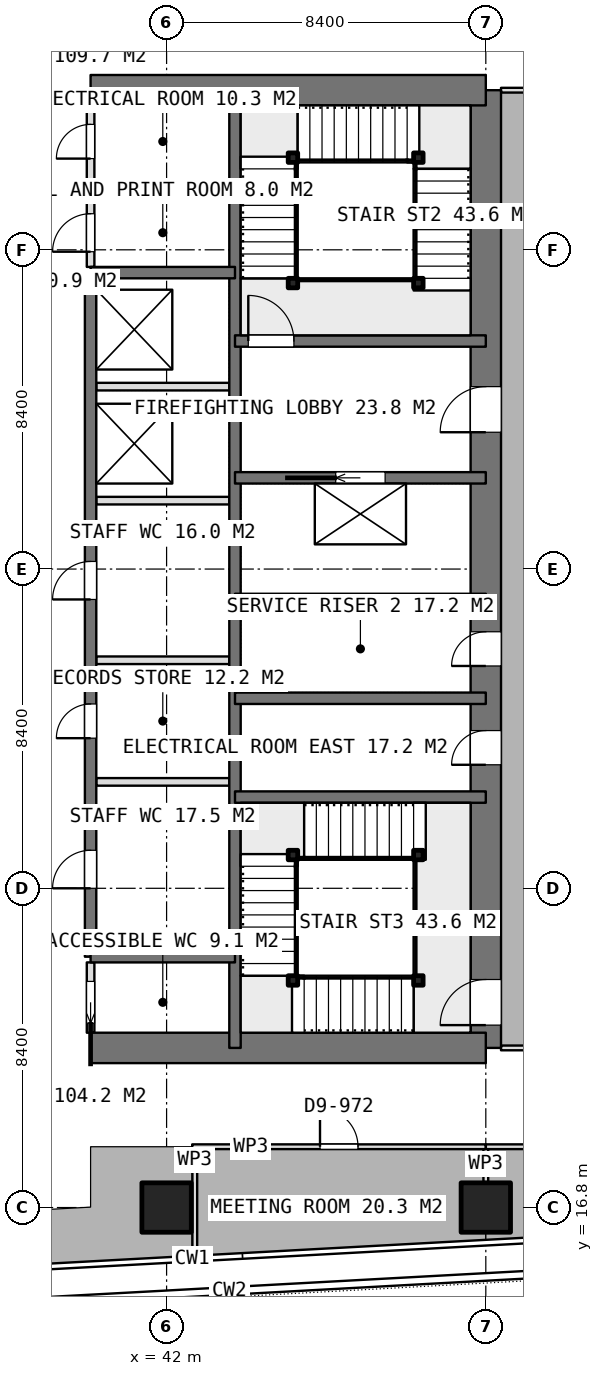
"""IFC4 building model, lengths in metres.
Left out: names, types, materials, properties, quantities, classifications, styles, units other than length and angle.
Written with IfcOpenShell. Run it as: python <this file> out.ifc"""

import sys

from ifc_helpers import new_model, si_unit, direction, frame, frame_2d, origin, origin_2d, place, context, subcontext, project, spatial, rectangle, extrude, element, fill, save


model = new_model("IFC4")
c1 = context("Model", 3, precision=1e-05, world=origin(), true_north=direction((0.0, 1.0)))
c2 = subcontext(c1, "Body", "Model", "MODEL_VIEW")
j1 = project(units=[si_unit("LENGTHUNIT", "METRE"), si_unit("PLANEANGLEUNIT", "RADIAN")], contexts=[c1])
p1 = place(None, origin())
s1 = spatial("IfcSite", under=j1, at=p1, CompositionType="ELEMENT")
p2 = place(p1, origin())
s2 = spatial("IfcBuilding", under=s1, at=p2, CompositionType="ELEMENT")
p3 = place(p2, frame((0.0, 0.0, 261.35)))
s3 = spatial("IfcBuildingStorey", under=s2, at=p3, CompositionType="ELEMENT", Elevation=261.35)
for number, where, z_axis, x_axis in (
    (1, (40.0, 21.0, 0.0), (0.0, 0.0, 1.0), (1.0, 0.0, 0.0)),
    (2, (40.0, 46.2, 0.0), (0.0, 0.0, 1.0), (1.0, 0.0, 0.0)),
):
    element("IfcWall", number, at=place(p3, frame(where, z_axis=z_axis, x_axis=x_axis)), inside=s3, PredefinedType="SHEAR", context=c2, shape_type="SweptSolid", body=[
        extrude(rectangle(XDim=10.4, YDim=0.8, at=frame_2d((5.2, 0.0))), origin(), (0.0, 0.0, 1.0), 3.75),
    ])
p4 = place(p3, frame((50.4, 21.0, 0.0), z_axis=(0.0, 0.0, 1.0), x_axis=(0.0, 1.0, 0.0)))
e3 = element("IfcWall", 3, at=p4, inside=s3, PredefinedType="SHEAR", context=c2, shape_type="SweptSolid", body=[
    extrude(rectangle(XDim=25.2, YDim=0.8, at=frame_2d((12.6, 0.0))), origin(), (0.0, 0.0, 1.0), 3.75),
])
p5 = place(p4, frame((16.2, 0.0, 0.0)))
e4 = element("IfcOpeningElement", 4, at=p5, cuts=e3, PredefinedType="OPENING", context=c2, shape_type="SweptSolid", body=[
    extrude(rectangle(XDim=1.2, YDim=2.1, at=frame_2d((0.6, 1.05))), frame((0.0, 0.41, 0.0), z_axis=(0.0, -1.0, 0.0), x_axis=(1.0, 0.0, 0.0)), (0.0, 0.0, 1.0), 0.82),
])
p6 = place(p4, frame((10.05, 0.0, 0.0)))
e5 = element("IfcOpeningElement", 5, at=p6, cuts=e3, PredefinedType="OPENING", context=c2, shape_type="SweptSolid", body=[
    extrude(rectangle(XDim=0.9, YDim=2.1, at=frame_2d((0.45, 1.05))), frame((0.0, 0.41, 0.0), z_axis=(0.0, -1.0, 0.0), x_axis=(1.0, 0.0, 0.0)), (0.0, 0.0, 1.0), 0.82),
])
p7 = place(p4, frame((7.45, 0.0, 0.0)))
e6 = element("IfcOpeningElement", 6, at=p7, cuts=e3, PredefinedType="OPENING", context=c2, shape_type="SweptSolid", body=[
    extrude(rectangle(XDim=0.9, YDim=2.1, at=frame_2d((0.45, 1.05))), frame((0.0, 0.41, 0.0), z_axis=(0.0, -1.0, 0.0), x_axis=(1.0, 0.0, 0.0)), (0.0, 0.0, 1.0), 0.82),
])
p8 = place(p4, frame((0.6, 0.0, 0.0)))
e7 = element("IfcOpeningElement", 7, at=p8, cuts=e3, PredefinedType="OPENING", context=c2, shape_type="SweptSolid", body=[
    extrude(rectangle(XDim=1.2, YDim=2.1, at=frame_2d((0.6, 1.05))), frame((0.0, 0.41, 0.0), z_axis=(0.0, -1.0, 0.0), x_axis=(1.0, 0.0, 0.0)), (0.0, 0.0, 1.0), 0.82),
])
p9 = place(p3, frame((43.8, 21.0, 0.0), z_axis=(0.0, 0.0, 1.0), x_axis=(0.0, 1.0, 0.0)))
e8 = element("IfcWall", 8, at=p9, inside=s3, PredefinedType="SHEAR", context=c2, shape_type="SweptSolid", body=[
    extrude(rectangle(XDim=25.2, YDim=0.3, at=frame_2d((12.6, 0.0))), origin(), (0.0, 0.0, 1.0), 3.75),
])
p10 = place(p3, frame((40.0, 23.4, 0.0), z_axis=(0.0, 0.0, 1.0), x_axis=(0.0, 1.0, 0.0)))
e9 = element("IfcWall", 9, at=p10, inside=s3, PredefinedType="SHEAR", context=c2, shape_type="SweptSolid", body=[
    extrude(rectangle(XDim=18.0, YDim=0.3, at=frame_2d((9.0, 0.0))), origin(), (0.0, 0.0, 1.0), 3.75),
])
p11 = place(p10, frame((1.8, 0.0, 0.0)))
e10 = element("IfcOpeningElement", 10, at=p11, cuts=e9, PredefinedType="OPENING", context=c2, shape_type="SweptSolid", body=[
    extrude(rectangle(XDim=1.0, YDim=2.1, at=frame_2d((0.5, 1.05))), frame((0.0, 0.16, 0.0), z_axis=(0.0, -1.0, 0.0), x_axis=(1.0, 0.0, 0.0)), (0.0, 0.0, 1.0), 0.32),
])
p12 = place(p10, frame((5.75, 0.0, 0.0)))
e11 = element("IfcOpeningElement", 11, at=p12, cuts=e9, PredefinedType="OPENING", context=c2, shape_type="SweptSolid", body=[
    extrude(rectangle(XDim=0.9, YDim=2.1, at=frame_2d((0.45, 1.05))), frame((0.0, 0.16, 0.0), z_axis=(0.0, -1.0, 0.0), x_axis=(1.0, 0.0, 0.0)), (0.0, 0.0, 1.0), 0.32),
])
p13 = place(p10, frame((9.4, 0.0, 0.0)))
e12 = element("IfcOpeningElement", 12, at=p13, cuts=e9, PredefinedType="OPENING", context=c2, shape_type="SweptSolid", body=[
    extrude(rectangle(XDim=1.0, YDim=2.1, at=frame_2d((0.5, 1.05))), frame((0.0, 0.16, 0.0), z_axis=(0.0, -1.0, 0.0), x_axis=(1.0, 0.0, 0.0)), (0.0, 0.0, 1.0), 0.32),
])
for number, where, z_axis, x_axis in (
    (13, (40.0, 23.4, 0.0), (0.0, 0.0, 1.0), (1.0, 0.0, 0.0)),
    (14, (40.0, 41.4, 0.0), (0.0, 0.0, 1.0), (1.0, 0.0, 0.0)),
):
    element("IfcWall", number, at=place(p3, frame(where, z_axis=z_axis, x_axis=x_axis)), inside=s3, PredefinedType="SHEAR", context=c2, shape_type="SweptSolid", body=[
        extrude(rectangle(XDim=3.8, YDim=0.3, at=frame_2d((1.9, 0.0))), origin(), (0.0, 0.0, 1.0), 3.75),
    ])
for number, where, z_axis, x_axis in (
    (15, (43.8, 27.6, 0.0), (0.0, 0.0, 1.0), (1.0, 0.0, 0.0)),
    (16, (43.8, 30.2, 0.0), (0.0, 0.0, 1.0), (1.0, 0.0, 0.0)),
    (17, (43.8, 32.8, 0.0), (0.0, 0.0, 1.0), (1.0, 0.0, 0.0)),
):
    element("IfcWall", number, at=place(p3, frame(where, z_axis=z_axis, x_axis=x_axis)), inside=s3, PredefinedType="SHEAR", context=c2, shape_type="SweptSolid", body=[
        extrude(rectangle(XDim=6.6, YDim=0.3, at=frame_2d((3.3, 0.0))), origin(), (0.0, 0.0, 1.0), 3.75),
    ])
p14 = place(p3, frame((43.8, 36.0, 0.0), z_axis=(0.0, 0.0, 1.0), x_axis=(1.0, 0.0, 0.0)))
e18 = element("IfcWall", 18, at=p14, inside=s3, PredefinedType="SHEAR", context=c2, shape_type="SweptSolid", body=[
    extrude(rectangle(XDim=6.6, YDim=0.3, at=frame_2d((3.3, 0.0))), origin(), (0.0, 0.0, 1.0), 3.75),
])
p15 = place(p14, frame((2.65, 0.0, 0.0)))
e19 = element("IfcOpeningElement", 19, at=p15, cuts=e18, PredefinedType="OPENING", context=c2, shape_type="SweptSolid", body=[
    extrude(rectangle(XDim=1.3, YDim=2.1, at=frame_2d((0.65, 1.05))), frame((0.0, 0.16, 0.0), z_axis=(0.0, -1.0, 0.0), x_axis=(1.0, 0.0, 0.0)), (0.0, 0.0, 1.0), 0.32),
])
p16 = place(p3, frame((43.8, 39.6, 0.0), z_axis=(0.0, 0.0, 1.0), x_axis=(1.0, 0.0, 0.0)))
e20 = element("IfcWall", 20, at=p16, inside=s3, PredefinedType="SHEAR", context=c2, shape_type="SweptSolid", body=[
    extrude(rectangle(XDim=6.6, YDim=0.3, at=frame_2d((3.3, 0.0))), origin(), (0.0, 0.0, 1.0), 3.75),
])
p17 = place(p16, frame((0.35, 0.0, 0.0)))
e21 = element("IfcOpeningElement", 21, at=p17, cuts=e20, PredefinedType="OPENING", context=c2, shape_type="SweptSolid", body=[
    extrude(rectangle(XDim=1.2, YDim=2.1, at=frame_2d((0.6, 1.05))), frame((0.0, 0.16, 0.0), z_axis=(0.0, -1.0, 0.0), x_axis=(1.0, 0.0, 0.0)), (0.0, 0.0, 1.0), 0.32),
])
for number, where, z_axis, x_axis in (
    (22, (42.0, 16.8, 0.0), (0.0, 0.0, 1.0), (1.0, 0.0, 0.0)),
    (23, (50.4, 16.8, 0.0), (0.0, 0.0, 1.0), (1.0, 0.0, 0.0)),
):
    element("IfcColumn", number, at=place(p3, frame(where, z_axis=z_axis, x_axis=x_axis)), inside=s3, PredefinedType="COLUMN", context=c2, shape_type="SweptSolid", body=[
        extrude(rectangle(XDim=1.3, YDim=1.3, at=origin_2d()), origin(), (0.0, 0.0, 1.0), 3.75),
    ])
for number, where, z_axis, x_axis in (
    (24, (40.15, 35.4, 0.0), (0.0, 0.0, 1.0), (1.0, 0.0, 0.0)),
    (25, (40.15, 38.4, 0.0), (0.0, 0.0, 1.0), (1.0, 0.0, 0.0)),
):
    element("IfcWall", number, at=place(p3, frame(where, z_axis=z_axis, x_axis=x_axis)), inside=s3, PredefinedType="PARTITIONING", context=c2, shape_type="SweptSolid", body=[
        extrude(rectangle(XDim=3.5, YDim=0.2, at=frame_2d((1.75, 0.0))), origin(), (0.0, 0.0, 1.0), 3.5),
    ])
p18 = place(p3, frame((40.0, 21.4, 0.0), z_axis=(0.0, 0.0, 1.0), x_axis=(0.0, 1.0, 0.0)))
e26 = element("IfcWall", 26, at=p18, inside=s3, PredefinedType="PARTITIONING", context=c2, shape_type="SweptSolid", body=[
    extrude(rectangle(XDim=1.85, YDim=0.2, at=frame_2d((0.925, 0.0))), origin(), (0.0, 0.0, 1.0), 3.5),
])
p19 = place(p18, frame((0.25, 0.0, 0.0)))
e27 = element("IfcOpeningElement", 27, at=p19, cuts=e26, PredefinedType="OPENING", context=c2, shape_type="SweptSolid", body=[
    extrude(rectangle(XDim=1.1, YDim=2.1, at=frame_2d((0.55, 1.05))), frame((0.0, 0.11, 0.0), z_axis=(0.0, -1.0, 0.0), x_axis=(1.0, 0.0, 0.0)), (0.0, 0.0, 1.0), 0.22),
])
p20 = place(p3, frame((40.0, 41.55, 0.0), z_axis=(0.0, 0.0, 1.0), x_axis=(0.0, 1.0, 0.0)))
e28 = element("IfcWall", 28, at=p20, inside=s3, PredefinedType="PARTITIONING", context=c2, shape_type="SweptSolid", body=[
    extrude(rectangle(XDim=4.25, YDim=0.2, at=frame_2d((2.125, 0.0))), origin(), (0.0, 0.0, 1.0), 3.5),
])
p21 = place(p20, frame((2.85, 0.0, 0.0)))
e29 = element("IfcOpeningElement", 29, at=p21, cuts=e28, PredefinedType="OPENING", context=c2, shape_type="SweptSolid", body=[
    extrude(rectangle(XDim=0.9, YDim=2.1, at=frame_2d((0.45, 1.05))), frame((0.0, 0.11, 0.0), z_axis=(0.0, -1.0, 0.0), x_axis=(1.0, 0.0, 0.0)), (0.0, 0.0, 1.0), 0.22),
])
p22 = place(p20, frame((0.4, 0.0, 0.0)))
e30 = element("IfcOpeningElement", 30, at=p22, cuts=e28, PredefinedType="OPENING", context=c2, shape_type="SweptSolid", body=[
    extrude(rectangle(XDim=1.0, YDim=2.1, at=frame_2d((0.5, 1.05))), frame((0.0, 0.11, 0.0), z_axis=(0.0, -1.0, 0.0), x_axis=(1.0, 0.0, 0.0)), (0.0, 0.0, 1.0), 0.22),
])
for number, where, z_axis, x_axis in (
    (31, (40.15, 28.0, 0.0), (0.0, 0.0, 1.0), (1.0, 0.0, 0.0)),
    (32, (40.15, 31.2, 0.0), (0.0, 0.0, 1.0), (1.0, 0.0, 0.0)),
):
    element("IfcWall", number, at=place(p3, frame(where, z_axis=z_axis, x_axis=x_axis)), inside=s3, PredefinedType="PARTITIONING", context=c2, shape_type="SweptSolid", body=[
        extrude(rectangle(XDim=3.5, YDim=0.2, at=frame_2d((1.75, 0.0))), origin(), (0.0, 0.0, 1.0), 3.5),
    ])
p23 = place(p3, frame((40.0, 43.5, 0.0), z_axis=(0.0, 0.0, 1.0), x_axis=(1.0, 0.0, 0.0)))
e33 = element("IfcWall", 33, at=p23, inside=s3, PredefinedType="PARTITIONING", context=c2, shape_type="SweptSolid", body=[
    extrude(rectangle(XDim=3.65, YDim=0.2, at=frame_2d((1.825, 0.0))), origin(), (0.0, 0.0, 1.0), 3.5),
])
p24 = place(p3, frame((50.4, 18.4, 0.0), z_axis=(0.0, 0.0, 1.0), x_axis=(0.0, -1.0, 0.0)))
e34 = element("IfcWall", 34, at=p24, inside=s3, PredefinedType="PARTITIONING", context=c2, shape_type="SweptSolid", body=[
    extrude(rectangle(XDim=0.93, YDim=0.125, at=frame_2d((0.465, 0.0))), origin(), (0.0, 0.0, 1.0), 3.5),
])
p25 = place(p3, frame((42.742, 15.538, 0.0), z_axis=(0.0, 0.0, 1.0), x_axis=(0.0, 1.0, 0.0)))
e35 = element("IfcWall", 35, at=p25, inside=s3, PredefinedType="PARTITIONING", context=c2, shape_type="SweptSolid", body=[
    extrude(rectangle(XDim=2.799, YDim=0.125, at=frame_2d((1.399, 0.0))), origin(), (0.0, 0.0, 1.0), 3.5),
])
p26 = place(p3, frame((42.674, 18.4, 0.0), z_axis=(0.0, 0.0, 1.0), x_axis=(1.0, 0.0, 0.0)))
e36 = element("IfcWall", 36, at=p26, inside=s3, PredefinedType="PARTITIONING", context=c2, shape_type="SweptSolid", body=[
    extrude(rectangle(XDim=7.726, YDim=0.125, at=frame_2d((3.863, 0.0))), origin(), (0.0, 0.0, 1.0), 3.5),
])
p27 = place(p26, frame((3.363, 0.0, 0.0)))
e37 = element("IfcOpeningElement", 37, at=p27, cuts=e36, PredefinedType="OPENING", context=c2, shape_type="SweptSolid", body=[
    extrude(rectangle(XDim=1.0, YDim=2.1, at=frame_2d((0.5, 1.05))), frame((0.0, 0.073, 0.0), z_axis=(0.0, -1.0, 0.0), x_axis=(1.0, 0.0, 0.0)), (0.0, 0.0, 1.0), 0.145),
])
p28 = place(p3, frame((50.401, 18.4, 0.0), z_axis=(0.0, 0.0, 1.0), x_axis=(1.0, 0.0, 0.0)))
e38 = element("IfcWall", 38, at=p28, inside=s3, PredefinedType="PARTITIONING", context=c2, shape_type="SweptSolid", body=[
    extrude(rectangle(XDim=5.999, YDim=0.125, at=frame_2d((3.0, 0.0))), origin(), (0.0, 0.0, 1.0), 3.5),
])
p29 = place(p28, frame((2.499, 0.0, 0.0)))
e39 = element("IfcOpeningElement", 39, at=p29, cuts=e38, PredefinedType="OPENING", context=c2, shape_type="SweptSolid", body=[
    extrude(rectangle(XDim=1.0, YDim=2.1, at=frame_2d((0.5, 1.05))), frame((0.0, 0.073, 0.0), z_axis=(0.0, -1.0, 0.0), x_axis=(1.0, 0.0, 0.0)), (0.0, 0.0, 1.0), 0.145),
])
for number, where, z_axis, x_axis in (
    (40, (53.124, 21.0, 0.0), (0.0, 0.0, 1.0), (-1.0, 0.0, 0.0)),
    (41, (50.8, 46.2, 0.0), (0.0, 0.0, 1.0), (1.0, 0.0, 0.0)),
):
    element("IfcWall", number, at=place(p3, frame(where, z_axis=z_axis, x_axis=x_axis)), inside=s3, PredefinedType="PARTITIONING", context=c2, shape_type="SweptSolid", body=[
        extrude(rectangle(XDim=2.324, YDim=0.125, at=frame_2d((1.162, 0.0))), origin(), (0.0, 0.0, 1.0), 3.5),
    ])
for number, where, z_axis, x_axis in (
    (42, (45.325, 41.125, 0.0), (0.0, 0.0, 1.0), (1.0, 0.0, 0.0)),
    (43, (45.325, 44.425, 0.0), (0.0, 0.0, 1.0), (1.0, 0.0, 0.0)),
    (44, (48.625, 44.425, 0.0), (0.0, 0.0, 1.0), (1.0, 0.0, 0.0)),
    (45, (48.625, 41.125, 0.0), (0.0, 0.0, 1.0), (1.0, 0.0, 0.0)),
    (46, (48.625, 22.775, 0.0), (0.0, 0.0, 1.0), (1.0, 0.0, 0.0)),
    (47, (45.325, 22.775, 0.0), (0.0, 0.0, 1.0), (1.0, 0.0, 0.0)),
    (48, (45.325, 26.075, 0.0), (0.0, 0.0, 1.0), (1.0, 0.0, 0.0)),
    (49, (48.625, 26.075, 0.0), (0.0, 0.0, 1.0), (1.0, 0.0, 0.0)),
):
    element("IfcColumn", number, at=place(p3, frame(where, z_axis=z_axis, x_axis=x_axis)), inside=s3, PredefinedType="COLUMN", context=c2, shape_type="SweptSolid", body=[
        extrude(rectangle(XDim=0.25, YDim=0.25, at=origin_2d()), origin(), (0.0, 0.0, 1.0), 3.75),
    ])
p30 = place(p5, origin())
e50 = element("IfcDoor", 50, at=p30, inside=s3, OperationType="SINGLE_SWING_LEFT", PredefinedType="DOOR", context=c2, shape_type="SweptSolid", body=[
    extrude(rectangle(XDim=1.2, YDim=2.1, at=frame_2d((0.6, 1.05))), frame((0.0, 0.025, 0.0), z_axis=(0.0, -1.0, 0.0), x_axis=(1.0, 0.0, 0.0)), (0.0, 0.0, 1.0), 0.05),
])
fill(e4, e50)
p31 = place(p6, origin())
e51 = element("IfcDoor", 51, at=p31, inside=s3, OperationType="SINGLE_SWING_LEFT", PredefinedType="DOOR", context=c2, shape_type="SweptSolid", body=[
    extrude(rectangle(XDim=0.9, YDim=2.1, at=frame_2d((0.45, 1.05))), frame((0.0, 0.025, 0.0), z_axis=(0.0, -1.0, 0.0), x_axis=(1.0, 0.0, 0.0)), (0.0, 0.0, 1.0), 0.05),
])
fill(e5, e51)
p32 = place(p7, origin())
e52 = element("IfcDoor", 52, at=p32, inside=s3, OperationType="SINGLE_SWING_LEFT", PredefinedType="DOOR", context=c2, shape_type="SweptSolid", body=[
    extrude(rectangle(XDim=0.9, YDim=2.1, at=frame_2d((0.45, 1.05))), frame((0.0, 0.025, 0.0), z_axis=(0.0, -1.0, 0.0), x_axis=(1.0, 0.0, 0.0)), (0.0, 0.0, 1.0), 0.05),
])
fill(e6, e52)
p33 = place(p19, origin())
e53 = element("IfcDoor", 53, at=p33, inside=s3, OperationType="SLIDING_TO_LEFT", PredefinedType="DOOR", context=c2, shape_type="SweptSolid", body=[
    extrude(rectangle(XDim=1.1, YDim=2.1, at=frame_2d((0.55, 1.05))), frame((0.0, 0.025, 0.0), z_axis=(0.0, -1.0, 0.0), x_axis=(1.0, 0.0, 0.0)), (0.0, 0.0, 1.0), 0.05),
])
fill(e27, e53)
p34 = place(p21, origin())
e54 = element("IfcDoor", 54, at=p34, inside=s3, OperationType="SINGLE_SWING_LEFT", PredefinedType="DOOR", context=c2, shape_type="SweptSolid", body=[
    extrude(rectangle(XDim=0.9, YDim=2.1, at=frame_2d((0.45, 1.05))), frame((0.0, 0.025, 0.0), z_axis=(0.0, -1.0, 0.0), x_axis=(1.0, 0.0, 0.0)), (0.0, 0.0, 1.0), 0.05),
])
fill(e29, e54)
p35 = place(p22, origin())
e55 = element("IfcDoor", 55, at=p35, inside=s3, OperationType="SINGLE_SWING_LEFT", PredefinedType="DOOR", context=c2, shape_type="SweptSolid", body=[
    extrude(rectangle(XDim=1.0, YDim=2.1, at=frame_2d((0.5, 1.05))), frame((0.0, 0.025, 0.0), z_axis=(0.0, -1.0, 0.0), x_axis=(1.0, 0.0, 0.0)), (0.0, 0.0, 1.0), 0.05),
])
fill(e30, e55)
p36 = place(p11, origin())
e56 = element("IfcDoor", 56, at=p36, inside=s3, OperationType="SINGLE_SWING_LEFT", PredefinedType="DOOR", context=c2, shape_type="SweptSolid", body=[
    extrude(rectangle(XDim=1.0, YDim=2.1, at=frame_2d((0.5, 1.05))), frame((0.0, 0.025, 0.0), z_axis=(0.0, -1.0, 0.0), x_axis=(1.0, 0.0, 0.0)), (0.0, 0.0, 1.0), 0.05),
])
fill(e10, e56)
p37 = place(p12, origin())
e57 = element("IfcDoor", 57, at=p37, inside=s3, OperationType="SINGLE_SWING_LEFT", PredefinedType="DOOR", context=c2, shape_type="SweptSolid", body=[
    extrude(rectangle(XDim=0.9, YDim=2.1, at=frame_2d((0.45, 1.05))), frame((0.0, 0.025, 0.0), z_axis=(0.0, -1.0, 0.0), x_axis=(1.0, 0.0, 0.0)), (0.0, 0.0, 1.0), 0.05),
])
fill(e11, e57)
p38 = place(p13, origin())
e58 = element("IfcDoor", 58, at=p38, inside=s3, OperationType="SINGLE_SWING_LEFT", PredefinedType="DOOR", context=c2, shape_type="SweptSolid", body=[
    extrude(rectangle(XDim=1.0, YDim=2.1, at=frame_2d((0.5, 1.05))), frame((0.0, 0.025, 0.0), z_axis=(0.0, -1.0, 0.0), x_axis=(1.0, 0.0, 0.0)), (0.0, 0.0, 1.0), 0.05),
])
fill(e12, e58)
p39 = place(p15, origin())
e59 = element("IfcDoor", 59, at=p39, inside=s3, OperationType="SLIDING_TO_LEFT", PredefinedType="USERDEFINED", context=c2, shape_type="SweptSolid", body=[
    extrude(rectangle(XDim=1.3, YDim=2.1, at=frame_2d((0.65, 1.05))), frame((0.0, 0.025, 0.0), z_axis=(0.0, -1.0, 0.0), x_axis=(1.0, 0.0, 0.0)), (0.0, 0.0, 1.0), 0.05),
])
fill(e19, e59)
p40 = place(p27, origin())
e60 = element("IfcDoor", 60, at=p40, inside=s3, OperationType="SINGLE_SWING_LEFT", PredefinedType="DOOR", context=c2, shape_type="SweptSolid", body=[
    extrude(rectangle(XDim=1.0, YDim=2.1, at=frame_2d((0.5, 1.05))), frame((0.0, 0.025, 0.0), z_axis=(0.0, -1.0, 0.0), x_axis=(1.0, 0.0, 0.0)), (0.0, 0.0, 1.0), 0.05),
])
fill(e37, e60)
p41 = place(p17, origin())
e61 = element("IfcDoor", 61, at=p41, inside=s3, OperationType="SINGLE_SWING_RIGHT", PredefinedType="DOOR", context=c2, shape_type="SweptSolid", body=[
    extrude(rectangle(XDim=1.2, YDim=2.1, at=frame_2d((0.6, 1.05))), frame((0.0, 0.025, 0.0), z_axis=(0.0, -1.0, 0.0), x_axis=(1.0, 0.0, 0.0)), (0.0, 0.0, 1.0), 0.05),
])
fill(e21, e61)
p42 = place(p8, origin())
e62 = element("IfcDoor", 62, at=p42, inside=s3, OperationType="SINGLE_SWING_RIGHT", PredefinedType="DOOR", context=c2, shape_type="SweptSolid", body=[
    extrude(rectangle(XDim=1.2, YDim=2.1, at=frame_2d((0.6, 1.05))), frame((0.0, 0.025, 0.0), z_axis=(0.0, -1.0, 0.0), x_axis=(1.0, 0.0, 0.0)), (0.0, 0.0, 1.0), 0.05),
])
fill(e7, e62)
save(model, sys.argv[1])
